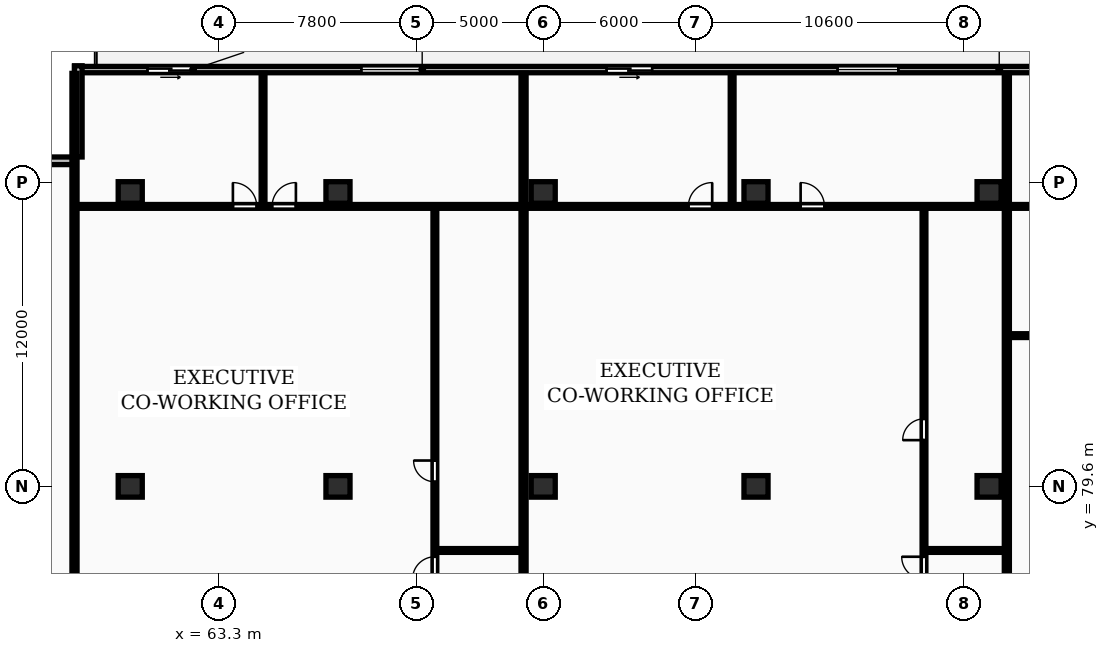
"""IFC4 building model, lengths in metres.
Left out: names, types, materials, properties, quantities, classifications, styles, units other than length and angle.
Written with IfcOpenShell. Run it as: python <this file> out.ifc"""

import sys

from ifc_helpers import new_model, si_unit, direction, frame, frame_2d, origin, origin_2d, place, context, subcontext, project, spatial, rectangle, extrude, element, fill, save


model = new_model("IFC4")
c1 = context("Model", 3, precision=1e-05, world=origin(), true_north=direction((0.0, 1.0)))
c2 = subcontext(c1, "Body", "Model", "MODEL_VIEW")
j1 = project(units=[si_unit("LENGTHUNIT", "METRE"), si_unit("PLANEANGLEUNIT", "RADIAN")], contexts=[c1])
p1 = place(None, origin())
s1 = spatial("IfcSite", under=j1, at=p1, CompositionType="ELEMENT")
p2 = place(p1, origin())
s2 = spatial("IfcBuilding", under=s1, at=p2, CompositionType="ELEMENT")
p3 = place(p2, frame((0.0, 0.0, 113.3)))
s3 = spatial("IfcBuildingStorey", under=s2, at=p3, CompositionType="ELEMENT", Elevation=113.3)
for number, where, z_axis, x_axis in (
    (1, (59.8, 79.6, 0.0), (0.0, 0.0, 1.0), (1.0, 0.0, 0.0)),
    (2, (59.8, 91.2, 0.0), (0.0, 0.0, 1.0), (1.0, 0.0, 0.0)),
    (3, (68.0, 79.6, 0.0), (0.0, 0.0, 1.0), (1.0, 0.0, 0.0)),
    (4, (68.0, 91.2, 0.0), (0.0, 0.0, 1.0), (1.0, 0.0, 0.0)),
    (5, (76.1, 79.6, 0.0), (0.0, 0.0, 1.0), (1.0, 0.0, 0.0)),
    (6, (76.1, 91.2, 0.0), (0.0, 0.0, 1.0), (1.0, 0.0, 0.0)),
    (7, (84.5, 79.6, 0.0), (0.0, 0.0, 1.0), (1.0, 0.0, 0.0)),
    (8, (84.5, 91.2, 0.0), (0.0, 0.0, 1.0), (1.0, 0.0, 0.0)),
    (9, (93.7, 79.6, 0.0), (0.0, 0.0, 1.0), (1.0, 0.0, 0.0)),
    (10, (93.7, 91.2, 0.0), (0.0, 0.0, 1.0), (1.0, 0.0, 0.0)),
):
    element("IfcColumn", number, at=place(p3, frame(where, z_axis=z_axis, x_axis=x_axis)), inside=s3, PredefinedType="COLUMN", context=c2, shape_type="SweptSolid", body=[
        extrude(rectangle(XDim=0.95, YDim=0.85, at=origin_2d()), origin(), (0.0, 0.0, 1.0), 3.25),
    ])
p4 = place(p3, frame((130.6, 96.05, 0.0), z_axis=(0.0, 0.0, 1.0), x_axis=(-1.0, 0.0, 0.0)))
e11 = element("IfcWall", 11, at=p4, inside=s3, PredefinedType="STANDARD", context=c2, shape_type="SweptSolid", body=[
    extrude(rectangle(XDim=73.0, YDim=0.25, at=frame_2d((36.5, 0.0))), origin(), (0.0, 0.0, 1.0), 2.97),
])
p5 = place(p4, frame((68.319, 0.0, 0.0)))
e12 = element("IfcOpeningElement", 12, at=p5, cuts=e11, PredefinedType="OPENING", context=c2, shape_type="SweptSolid", body=[
    extrude(rectangle(XDim=1.8, YDim=2.2, at=frame_2d((0.9, 1.1))), frame((0.0, 0.135, 0.0), z_axis=(0.0, -1.0, 0.0), x_axis=(1.0, 0.0, 0.0)), (0.0, 0.0, 1.0), 0.27),
])
p6 = place(p4, frame((59.277, 0.0, 0.85)))
e13 = element("IfcOpeningElement", 13, at=p6, cuts=e11, PredefinedType="OPENING", context=c2, shape_type="SweptSolid", body=[
    extrude(rectangle(XDim=2.4, YDim=1.9, at=frame_2d((1.2, 0.95))), frame((0.0, 0.135, 0.0), z_axis=(0.0, -1.0, 0.0), x_axis=(1.0, 0.0, 0.0)), (0.0, 0.0, 1.0), 0.27),
])
p7 = place(p4, frame((50.199, 0.0, 0.0)))
e14 = element("IfcOpeningElement", 14, at=p7, cuts=e11, PredefinedType="OPENING", context=c2, shape_type="SweptSolid", body=[
    extrude(rectangle(XDim=1.8, YDim=2.2, at=frame_2d((0.9, 1.1))), frame((0.0, 0.135, 0.0), z_axis=(0.0, -1.0, 0.0), x_axis=(1.0, 0.0, 0.0)), (0.0, 0.0, 1.0), 0.27),
])
p8 = place(p4, frame((40.481, 0.0, 0.85)))
e15 = element("IfcOpeningElement", 15, at=p8, cuts=e11, PredefinedType="OPENING", context=c2, shape_type="SweptSolid", body=[
    extrude(rectangle(XDim=2.4, YDim=1.9, at=frame_2d((1.2, 0.95))), frame((0.0, 0.135, 0.0), z_axis=(0.0, -1.0, 0.0), x_axis=(1.0, 0.0, 0.0)), (0.0, 0.0, 1.0), 0.27),
])
p9 = place(p4, frame((31.93, 0.0, 0.0)))
e16 = element("IfcOpeningElement", 16, at=p9, cuts=e11, PredefinedType="OPENING", context=c2, shape_type="SweptSolid", body=[
    extrude(rectangle(XDim=1.8, YDim=2.2, at=frame_2d((0.9, 1.1))), frame((0.0, 0.135, 0.0), z_axis=(0.0, -1.0, 0.0), x_axis=(1.0, 0.0, 0.0)), (0.0, 0.0, 1.0), 0.27),
])
p10 = place(p4, frame((26.042, 0.0, 0.85)))
e17 = element("IfcOpeningElement", 17, at=p10, cuts=e11, PredefinedType="OPENING", context=c2, shape_type="SweptSolid", body=[
    extrude(rectangle(XDim=2.4, YDim=1.9, at=frame_2d((1.2, 0.95))), frame((0.0, 0.135, 0.0), z_axis=(0.0, -1.0, 0.0), x_axis=(1.0, 0.0, 0.0)), (0.0, 0.0, 1.0), 0.27),
])
p11 = place(p4, frame((19.15, 0.0, 0.0)))
e18 = element("IfcOpeningElement", 18, at=p11, cuts=e11, PredefinedType="OPENING", context=c2, shape_type="SweptSolid", body=[
    extrude(rectangle(XDim=1.8, YDim=2.2, at=frame_2d((0.9, 1.1))), frame((0.0, 0.135, 0.0), z_axis=(0.0, -1.0, 0.0), x_axis=(1.0, 0.0, 0.0)), (0.0, 0.0, 1.0), 0.27),
])
p12 = place(p4, frame((12.886, 0.0, 0.85)))
e19 = element("IfcOpeningElement", 19, at=p12, cuts=e11, PredefinedType="OPENING", context=c2, shape_type="SweptSolid", body=[
    extrude(rectangle(XDim=1.8, YDim=1.8, at=frame_2d((0.9, 0.9))), frame((0.0, 0.135, 0.0), z_axis=(0.0, -1.0, 0.0), x_axis=(1.0, 0.0, 0.0)), (0.0, 0.0, 1.0), 0.27),
])
p13 = place(p4, frame((7.088, 0.0, 0.0)))
e20 = element("IfcOpeningElement", 20, at=p13, cuts=e11, PredefinedType="OPENING", context=c2, shape_type="SweptSolid", body=[
    extrude(rectangle(XDim=1.8, YDim=2.2, at=frame_2d((0.9, 1.1))), frame((0.0, 0.135, 0.0), z_axis=(0.0, -1.0, 0.0), x_axis=(1.0, 0.0, 0.0)), (0.0, 0.0, 1.0), 0.27),
])
p14 = place(p4, frame((0.9, 0.0, 0.85)))
e21 = element("IfcOpeningElement", 21, at=p14, cuts=e11, PredefinedType="OPENING", context=c2, shape_type="SweptSolid", body=[
    extrude(rectangle(XDim=2.4, YDim=1.9, at=frame_2d((1.2, 0.95))), frame((0.0, 0.135, 0.0), z_axis=(0.0, -1.0, 0.0), x_axis=(1.0, 0.0, 0.0)), (0.0, 0.0, 1.0), 0.27),
])
p15 = place(p3, frame((57.75, 96.2, 0.0), z_axis=(0.0, 0.0, 1.0), x_axis=(0.0, -1.0, 0.0)))
e22 = element("IfcWall", 22, at=p15, inside=s3, PredefinedType="STANDARD", context=c2, shape_type="SweptSolid", body=[
    extrude(rectangle(XDim=3.6, YDim=0.3, at=frame_2d((1.8, 0.0))), origin(), (0.0, 0.0, 1.0), 2.97),
])
p16 = place(p3, frame((57.6, 92.45, 0.0), z_axis=(0.0, 0.0, 1.0), x_axis=(-1.0, 0.0, 0.0)))
e23 = element("IfcWall", 23, at=p16, inside=s3, PredefinedType="STANDARD", context=c2, shape_type="SweptSolid", body=[
    extrude(rectangle(XDim=3.6, YDim=0.3, at=frame_2d((1.8, 0.0))), origin(), (0.0, 0.0, 1.0), 2.97),
])
for number, where, z_axis, x_axis in (
    (24, (57.6, 69.83, 0.0), (0.0, 0.0, 1.0), (0.0, 1.0, 0.0)),
    (25, (75.325, 69.83, 0.0), (0.0, 0.0, 1.0), (0.0, 1.0, 0.0)),
):
    element("IfcWall", number, at=place(p3, frame(where, z_axis=z_axis, x_axis=x_axis)), inside=s3, PredefinedType="PARTITIONING", context=c2, shape_type="SweptSolid", body=[
        extrude(rectangle(XDim=26.07, YDim=0.2, at=frame_2d((13.035, 0.0))), origin(), (0.0, 0.0, 1.0), 2.97),
    ])
p17 = place(p3, frame((71.885, 77.07, 0.0), z_axis=(0.0, 0.0, 1.0), x_axis=(1.0, 0.0, 0.0)))
e26 = element("IfcWall", 26, at=p17, inside=s3, PredefinedType="PARTITIONING", context=c2, shape_type="SweptSolid", body=[
    extrude(rectangle(XDim=3.36, YDim=0.15, at=frame_2d((1.68, 0.0))), origin(), (0.0, 0.0, 1.0), 2.97),
])
p18 = place(p3, frame((71.825, 69.81, 0.0), z_axis=(0.0, 0.0, 1.0), x_axis=(0.0, 1.0, 0.0)))
e27 = element("IfcWall", 27, at=p18, inside=s3, PredefinedType="PARTITIONING", context=c2, shape_type="SweptSolid", body=[
    extrude(rectangle(XDim=20.78, YDim=0.15, at=frame_2d((10.39, 0.0))), origin(), (0.0, 0.0, 1.0), 2.97),
])
p19 = place(p18, frame((2.406, 0.0, 0.0)))
e28 = element("IfcOpeningElement", 28, at=p19, cuts=e27, PredefinedType="OPENING", context=c2, shape_type="SweptSolid", body=[
    extrude(rectangle(XDim=0.96, YDim=2.1, at=frame_2d((0.48, 1.05))), frame((0.0, 0.085, 0.0), z_axis=(0.0, -1.0, 0.0), x_axis=(1.0, 0.0, 0.0)), (0.0, 0.0, 1.0), 0.17),
])
p20 = place(p18, frame((6.133, 0.0, 0.0)))
e29 = element("IfcOpeningElement", 29, at=p20, cuts=e27, PredefinedType="OPENING", context=c2, shape_type="SweptSolid", body=[
    extrude(rectangle(XDim=0.88, YDim=2.06, at=frame_2d((0.44, 1.03))), frame((0.0, 0.085, 0.0), z_axis=(0.0, -1.0, 0.0), x_axis=(1.0, 0.0, 0.0)), (0.0, 0.0, 1.0), 0.17),
])
p21 = place(p18, frame((9.97, 0.0, 0.0)))
e30 = element("IfcOpeningElement", 30, at=p21, cuts=e27, PredefinedType="OPENING", context=c2, shape_type="SweptSolid", body=[
    extrude(rectangle(XDim=0.84, YDim=2.04, at=frame_2d((0.42, 1.02))), frame((0.0, 0.085, 0.0), z_axis=(0.0, -1.0, 0.0), x_axis=(1.0, 0.0, 0.0)), (0.0, 0.0, 1.0), 0.17),
])
p22 = place(p3, frame((65.042, 90.73, 0.0), z_axis=(0.0, 0.0, 1.0), x_axis=(0.0, 1.0, 0.0)))
e31 = element("IfcWall", 31, at=p22, inside=s3, PredefinedType="PARTITIONING", context=c2, shape_type="SweptSolid", body=[
    extrude(rectangle(XDim=5.17, YDim=0.15, at=frame_2d((2.585, 0.0))), origin(), (0.0, 0.0, 1.0), 2.97),
])
p23 = place(p3, frame((57.68, 90.65, 0.0), z_axis=(0.0, 0.0, 1.0), x_axis=(1.0, 0.0, 0.0)))
e32 = element("IfcWall", 32, at=p23, inside=s3, PredefinedType="PARTITIONING", context=c2, shape_type="SweptSolid", body=[
    extrude(rectangle(XDim=17.565, YDim=0.15, at=frame_2d((8.782, 0.0))), origin(), (0.0, 0.0, 1.0), 2.97),
])
p24 = place(p23, frame((6.172, 0.0, 0.0)))
e33 = element("IfcOpeningElement", 33, at=p24, cuts=e32, PredefinedType="OPENING", context=c2, shape_type="SweptSolid", body=[
    extrude(rectangle(XDim=0.94, YDim=2.1, at=frame_2d((0.47, 1.05))), frame((0.0, 0.085, 0.0), z_axis=(0.0, -1.0, 0.0), x_axis=(1.0, 0.0, 0.0)), (0.0, 0.0, 1.0), 0.17),
])
p25 = place(p23, frame((7.719, 0.0, 0.0)))
e34 = element("IfcOpeningElement", 34, at=p25, cuts=e32, PredefinedType="OPENING", context=c2, shape_type="SweptSolid", body=[
    extrude(rectangle(XDim=0.94, YDim=2.1, at=frame_2d((0.47, 1.05))), frame((0.0, 0.085, 0.0), z_axis=(0.0, -1.0, 0.0), x_axis=(1.0, 0.0, 0.0)), (0.0, 0.0, 1.0), 0.17),
])
p26 = place(p3, frame((94.401, 69.83, 0.0), z_axis=(0.0, 0.0, 1.0), x_axis=(0.0, 1.0, 0.0)))
e35 = element("IfcWall", 35, at=p26, inside=s3, PredefinedType="PARTITIONING", context=c2, shape_type="SweptSolid", body=[
    extrude(rectangle(XDim=26.07, YDim=0.2, at=frame_2d((13.035, 0.0))), origin(), (0.0, 0.0, 1.0), 2.97),
])
p27 = place(p3, frame((91.191, 77.07, 0.0), z_axis=(0.0, 0.0, 1.0), x_axis=(1.0, 0.0, 0.0)))
e36 = element("IfcWall", 36, at=p27, inside=s3, PredefinedType="PARTITIONING", context=c2, shape_type="SweptSolid", body=[
    extrude(rectangle(XDim=3.13, YDim=0.15, at=frame_2d((1.565, 0.0))), origin(), (0.0, 0.0, 1.0), 2.97),
])
p28 = place(p3, frame((91.131, 69.81, 0.0), z_axis=(0.0, 0.0, 1.0), x_axis=(0.0, 1.0, 0.0)))
e37 = element("IfcWall", 37, at=p28, inside=s3, PredefinedType="PARTITIONING", context=c2, shape_type="SweptSolid", body=[
    extrude(rectangle(XDim=20.78, YDim=0.15, at=frame_2d((10.39, 0.0))), origin(), (0.0, 0.0, 1.0), 2.97),
])
p29 = place(p28, frame((2.406, 0.0, 0.0)))
e38 = element("IfcOpeningElement", 38, at=p29, cuts=e37, PredefinedType="OPENING", context=c2, shape_type="SweptSolid", body=[
    extrude(rectangle(XDim=0.96, YDim=2.1, at=frame_2d((0.48, 1.05))), frame((0.0, 0.085, 0.0), z_axis=(0.0, -1.0, 0.0), x_axis=(1.0, 0.0, 0.0)), (0.0, 0.0, 1.0), 0.17),
])
p30 = place(p28, frame((6.133, 0.0, 0.0)))
e39 = element("IfcOpeningElement", 39, at=p30, cuts=e37, PredefinedType="OPENING", context=c2, shape_type="SweptSolid", body=[
    extrude(rectangle(XDim=0.88, YDim=2.06, at=frame_2d((0.44, 1.03))), frame((0.0, 0.085, 0.0), z_axis=(0.0, -1.0, 0.0), x_axis=(1.0, 0.0, 0.0)), (0.0, 0.0, 1.0), 0.17),
])
p31 = place(p28, frame((11.615, 0.0, 0.0)))
e40 = element("IfcOpeningElement", 40, at=p31, cuts=e37, PredefinedType="OPENING", context=c2, shape_type="SweptSolid", body=[
    extrude(rectangle(XDim=0.84, YDim=2.04, at=frame_2d((0.42, 1.02))), frame((0.0, 0.085, 0.0), z_axis=(0.0, -1.0, 0.0), x_axis=(1.0, 0.0, 0.0)), (0.0, 0.0, 1.0), 0.17),
])
p32 = place(p3, frame((83.558, 90.73, 0.0), z_axis=(0.0, 0.0, 1.0), x_axis=(0.0, 1.0, 0.0)))
e41 = element("IfcWall", 41, at=p32, inside=s3, PredefinedType="PARTITIONING", context=c2, shape_type="SweptSolid", body=[
    extrude(rectangle(XDim=5.17, YDim=0.15, at=frame_2d((2.585, 0.0))), origin(), (0.0, 0.0, 1.0), 2.97),
])
p33 = place(p3, frame((75.405, 90.65, 0.0), z_axis=(0.0, 0.0, 1.0), x_axis=(1.0, 0.0, 0.0)))
e42 = element("IfcWall", 42, at=p33, inside=s3, PredefinedType="PARTITIONING", context=c2, shape_type="SweptSolid", body=[
    extrude(rectangle(XDim=18.916, YDim=0.15, at=frame_2d((9.458, 0.0))), origin(), (0.0, 0.0, 1.0), 2.97),
])
p34 = place(p33, frame((6.426, 0.0, 0.0)))
e43 = element("IfcOpeningElement", 43, at=p34, cuts=e42, PredefinedType="OPENING", context=c2, shape_type="SweptSolid", body=[
    extrude(rectangle(XDim=0.94, YDim=2.1, at=frame_2d((0.47, 1.05))), frame((0.0, 0.085, 0.0), z_axis=(0.0, -1.0, 0.0), x_axis=(1.0, 0.0, 0.0)), (0.0, 0.0, 1.0), 0.17),
])
p35 = place(p33, frame((10.856, 0.0, 0.0)))
e44 = element("IfcOpeningElement", 44, at=p35, cuts=e42, PredefinedType="OPENING", context=c2, shape_type="SweptSolid", body=[
    extrude(rectangle(XDim=0.94, YDim=2.1, at=frame_2d((0.47, 1.05))), frame((0.0, 0.085, 0.0), z_axis=(0.0, -1.0, 0.0), x_axis=(1.0, 0.0, 0.0)), (0.0, 0.0, 1.0), 0.17),
])
p36 = place(p3, frame((94.481, 85.55, 0.0), z_axis=(0.0, 0.0, 1.0), x_axis=(1.0, 0.0, 0.0)))
e45 = element("IfcWall", 45, at=p36, inside=s3, PredefinedType="PARTITIONING", context=c2, shape_type="SweptSolid", body=[
    extrude(rectangle(XDim=11.256, YDim=0.15, at=frame_2d((5.628, 0.0))), origin(), (0.0, 0.0, 1.0), 2.97),
])
p37 = place(p36, frame((2.72, 0.0, 0.0)))
e46 = element("IfcOpeningElement", 46, at=p37, cuts=e45, PredefinedType="OPENING", context=c2, shape_type="SweptSolid", body=[
    extrude(rectangle(XDim=0.92, YDim=2.08, at=frame_2d((0.46, 1.04))), frame((0.0, 0.085, 0.0), z_axis=(0.0, -1.0, 0.0), x_axis=(1.0, 0.0, 0.0)), (0.0, 0.0, 1.0), 0.17),
])
p38 = place(p3, frame((94.481, 90.65, 0.0), z_axis=(0.0, 0.0, 1.0), x_axis=(1.0, 0.0, 0.0)))
e47 = element("IfcWall", 47, at=p38, inside=s3, PredefinedType="PARTITIONING", context=c2, shape_type="SweptSolid", body=[
    extrude(rectangle(XDim=11.256, YDim=0.15, at=frame_2d((5.628, 0.0))), origin(), (0.0, 0.0, 1.0), 2.97),
])
p39 = place(p38, frame((5.158, 0.0, 0.0)))
e48 = element("IfcOpeningElement", 48, at=p39, cuts=e47, PredefinedType="OPENING", context=c2, shape_type="SweptSolid", body=[
    extrude(rectangle(XDim=0.94, YDim=2.1, at=frame_2d((0.47, 1.05))), frame((0.0, 0.085, 0.0), z_axis=(0.0, -1.0, 0.0), x_axis=(1.0, 0.0, 0.0)), (0.0, 0.0, 1.0), 0.17),
])
p40 = place(p5, origin())
e49 = element("IfcDoor", 49, at=p40, inside=s3, OperationType="SLIDING_TO_LEFT", PredefinedType="DOOR", context=c2, shape_type="SweptSolid", body=[
    extrude(rectangle(XDim=1.8, YDim=2.2, at=frame_2d((0.9, 1.1))), frame((0.0, 0.025, 0.0), z_axis=(0.0, -1.0, 0.0), x_axis=(1.0, 0.0, 0.0)), (0.0, 0.0, 1.0), 0.05),
])
fill(e12, e49)
p41 = place(p6, origin())
e50 = element("IfcWindow", 50, at=p41, inside=s3, PartitioningType="DOUBLE_PANEL_VERTICAL", PredefinedType="WINDOW", context=c2, shape_type="SweptSolid", body=[
    extrude(rectangle(XDim=2.4, YDim=1.9, at=frame_2d((1.2, 0.95))), frame((0.0, 0.03, 0.0), z_axis=(0.0, -1.0, 0.0), x_axis=(1.0, 0.0, 0.0)), (0.0, 0.0, 1.0), 0.06),
])
fill(e13, e50)
p42 = place(p7, origin())
e51 = element("IfcDoor", 51, at=p42, inside=s3, OperationType="SLIDING_TO_LEFT", PredefinedType="DOOR", context=c2, shape_type="SweptSolid", body=[
    extrude(rectangle(XDim=1.8, YDim=2.2, at=frame_2d((0.9, 1.1))), frame((0.0, 0.025, 0.0), z_axis=(0.0, -1.0, 0.0), x_axis=(1.0, 0.0, 0.0)), (0.0, 0.0, 1.0), 0.05),
])
fill(e14, e51)
p43 = place(p8, origin())
e52 = element("IfcWindow", 52, at=p43, inside=s3, PartitioningType="DOUBLE_PANEL_VERTICAL", PredefinedType="WINDOW", context=c2, shape_type="SweptSolid", body=[
    extrude(rectangle(XDim=2.4, YDim=1.9, at=frame_2d((1.2, 0.95))), frame((0.0, 0.03, 0.0), z_axis=(0.0, -1.0, 0.0), x_axis=(1.0, 0.0, 0.0)), (0.0, 0.0, 1.0), 0.06),
])
fill(e15, e52)
p44 = place(p20, origin())
e53 = element("IfcDoor", 53, at=p44, inside=s3, OperationType="SINGLE_SWING_LEFT", PredefinedType="DOOR", context=c2, shape_type="SweptSolid", body=[
    extrude(rectangle(XDim=0.88, YDim=2.06, at=frame_2d((0.44, 1.03))), frame((0.0, 0.025, 0.0), z_axis=(0.0, -1.0, 0.0), x_axis=(1.0, 0.0, 0.0)), (0.0, 0.0, 1.0), 0.05),
])
fill(e29, e53)
p45 = place(p21, origin())
e54 = element("IfcDoor", 54, at=p45, inside=s3, OperationType="SINGLE_SWING_RIGHT", PredefinedType="DOOR", context=c2, shape_type="SweptSolid", body=[
    extrude(rectangle(XDim=0.84, YDim=2.04, at=frame_2d((0.42, 1.02))), frame((0.0, 0.025, 0.0), z_axis=(0.0, -1.0, 0.0), x_axis=(1.0, 0.0, 0.0)), (0.0, 0.0, 1.0), 0.05),
])
fill(e30, e54)
p46 = place(p24, origin())
e55 = element("IfcDoor", 55, at=p46, inside=s3, OperationType="SINGLE_SWING_LEFT", PredefinedType="DOOR", context=c2, shape_type="SweptSolid", body=[
    extrude(rectangle(XDim=0.94, YDim=2.1, at=frame_2d((0.47, 1.05))), frame((0.0, 0.025, 0.0), z_axis=(0.0, -1.0, 0.0), x_axis=(1.0, 0.0, 0.0)), (0.0, 0.0, 1.0), 0.05),
])
fill(e33, e55)
p47 = place(p25, origin())
e56 = element("IfcDoor", 56, at=p47, inside=s3, OperationType="SINGLE_SWING_RIGHT", PredefinedType="DOOR", context=c2, shape_type="SweptSolid", body=[
    extrude(rectangle(XDim=0.94, YDim=2.1, at=frame_2d((0.47, 1.05))), frame((0.0, 0.025, 0.0), z_axis=(0.0, -1.0, 0.0), x_axis=(1.0, 0.0, 0.0)), (0.0, 0.0, 1.0), 0.05),
])
fill(e34, e56)
p48 = place(p30, origin())
e57 = element("IfcDoor", 57, at=p48, inside=s3, OperationType="SINGLE_SWING_RIGHT", PredefinedType="DOOR", context=c2, shape_type="SweptSolid", body=[
    extrude(rectangle(XDim=0.88, YDim=2.06, at=frame_2d((0.44, 1.03))), frame((0.0, 0.025, 0.0), z_axis=(0.0, -1.0, 0.0), x_axis=(1.0, 0.0, 0.0)), (0.0, 0.0, 1.0), 0.05),
])
fill(e39, e57)
p49 = place(p31, origin())
e58 = element("IfcDoor", 58, at=p49, inside=s3, OperationType="SINGLE_SWING_LEFT", PredefinedType="DOOR", context=c2, shape_type="SweptSolid", body=[
    extrude(rectangle(XDim=0.84, YDim=2.04, at=frame_2d((0.42, 1.02))), frame((0.0, 0.025, 0.0), z_axis=(0.0, -1.0, 0.0), x_axis=(1.0, 0.0, 0.0)), (0.0, 0.0, 1.0), 0.05),
])
fill(e40, e58)
p50 = place(p34, origin())
e59 = element("IfcDoor", 59, at=p50, inside=s3, OperationType="SINGLE_SWING_RIGHT", PredefinedType="DOOR", context=c2, shape_type="SweptSolid", body=[
    extrude(rectangle(XDim=0.94, YDim=2.1, at=frame_2d((0.47, 1.05))), frame((0.0, 0.025, 0.0), z_axis=(0.0, -1.0, 0.0), x_axis=(1.0, 0.0, 0.0)), (0.0, 0.0, 1.0), 0.05),
])
fill(e43, e59)
p51 = place(p35, origin())
e60 = element("IfcDoor", 60, at=p51, inside=s3, OperationType="SINGLE_SWING_LEFT", PredefinedType="DOOR", context=c2, shape_type="SweptSolid", body=[
    extrude(rectangle(XDim=0.94, YDim=2.1, at=frame_2d((0.47, 1.05))), frame((0.0, 0.025, 0.0), z_axis=(0.0, -1.0, 0.0), x_axis=(1.0, 0.0, 0.0)), (0.0, 0.0, 1.0), 0.05),
])
fill(e44, e60)
save(model, sys.argv[1])
